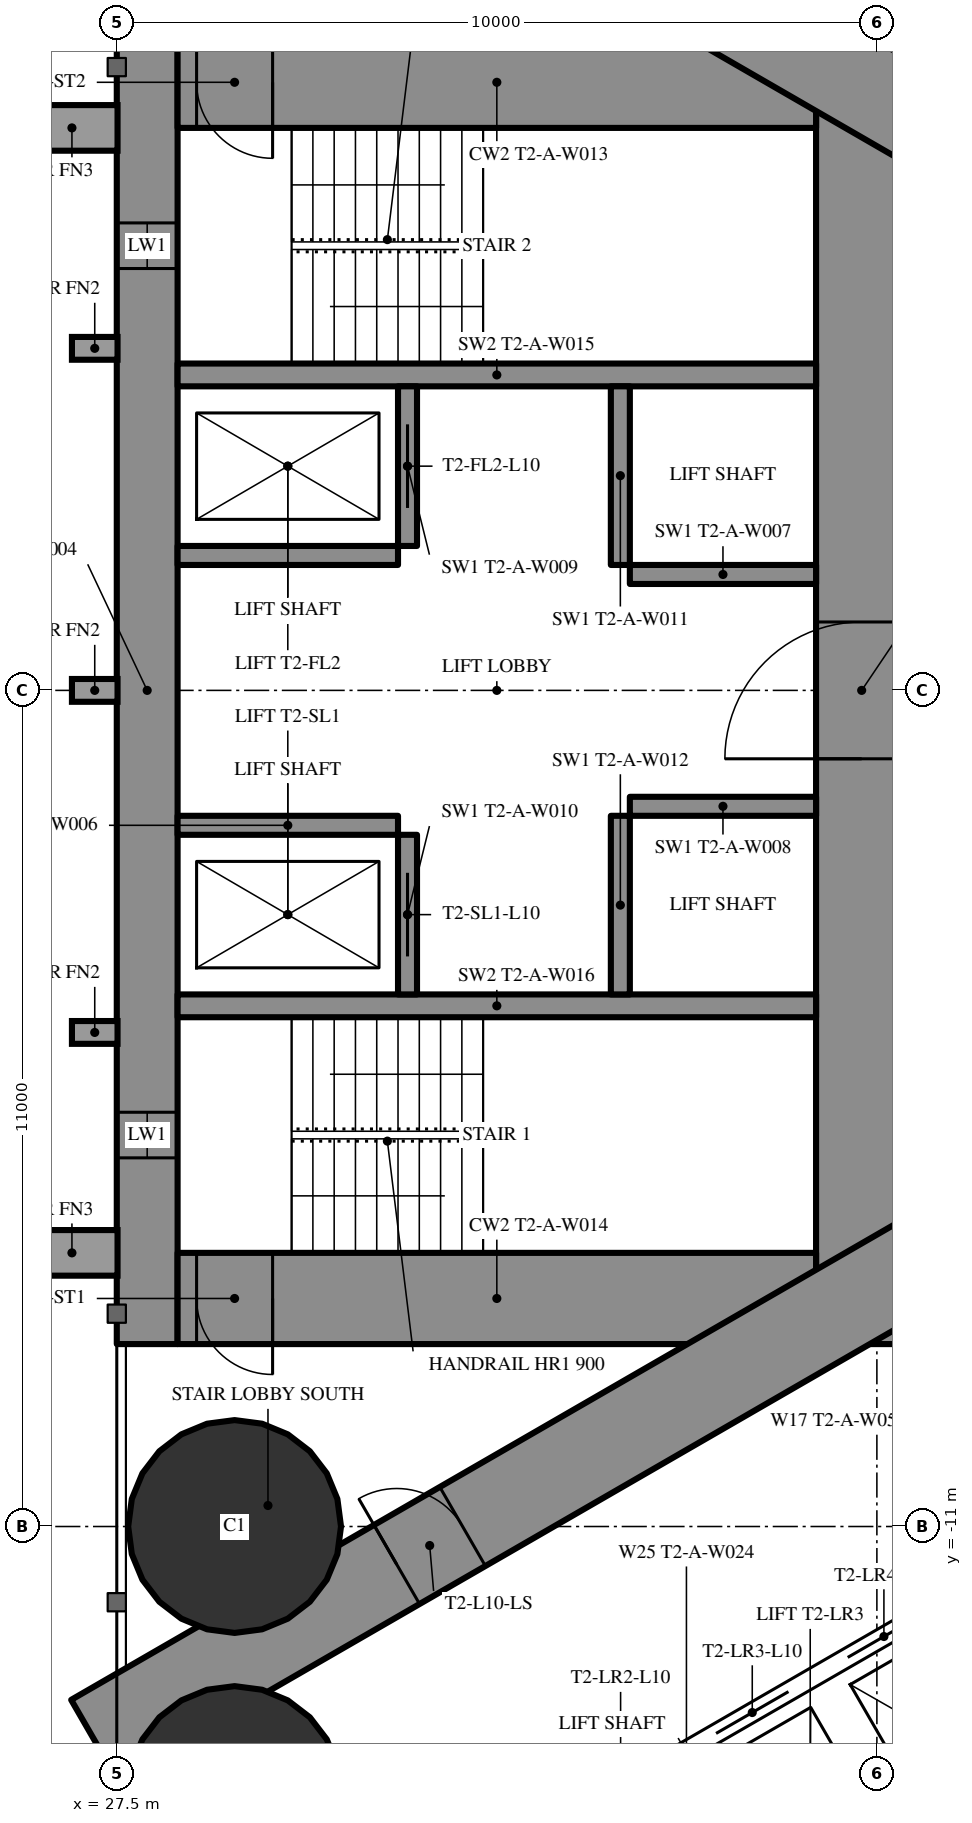
"""IFC4 building model, lengths in metres.
Left out: names, types, materials, properties, quantities, classifications, styles, units other than length and angle.
Written with IfcOpenShell. Run it as: python <this file> out.ifc"""

import sys

from ifc_helpers import new_model, si_unit, direction, frame, frame_2d, origin, origin_2d, place, context, subcontext, project, spatial, rectangle, hollow_circle, extrude, element, fill, save


model = new_model("IFC4")
c1 = context("Model", 3, precision=1e-05, world=origin(), true_north=direction((0.0, 1.0)))
c2 = subcontext(c1, "Body", "Model", "MODEL_VIEW")
j1 = project(units=[si_unit("LENGTHUNIT", "METRE"), si_unit("PLANEANGLEUNIT", "RADIAN")], contexts=[c1])
p1 = place(None, origin())
s1 = spatial("IfcSite", under=j1, at=p1, CompositionType="ELEMENT")
p2 = place(p1, origin())
s2 = spatial("IfcBuilding", under=s1, at=p2, CompositionType="ELEMENT")
p3 = place(p2, frame((0.0, 0.0, 42.5)))
s3 = spatial("IfcBuildingStorey", under=s2, at=p3, CompositionType="ELEMENT", Elevation=42.5)
for number, where, z_axis, x_axis in (
    (1, (29.05, -11.0, 0.0), (0.0, 0.0, 1.0), (1.0, 0.0, 0.0)),
    (2, (29.05, -14.5, 0.0), (0.0, 0.0, 1.0), (1.0, 0.0, 0.0)),
):
    element("IfcColumn", number, at=place(p3, frame(where, z_axis=z_axis, x_axis=x_axis)), inside=s3, PredefinedType="COLUMN", context=c2, shape_type="SweptSolid", body=[
        extrude(hollow_circle(Radius=1.4, WallThickness=0.12, at=origin_2d()), origin(), (0.0, 0.0, 1.0), 3.5),
    ])
p4 = place(p3, frame((27.9, -8.6, 0.0), z_axis=(0.0, 0.0, 1.0), x_axis=(0.0, 1.0, 0.0)))
e3 = element("IfcWall", 3, at=p4, inside=s3, PredefinedType="SHEAR", context=c2, shape_type="SweptSolid", body=[
    extrude(rectangle(XDim=17.2, YDim=0.8, at=frame_2d((8.6, 0.0))), origin(), (0.0, 0.0, 1.0), 3.5),
])
p5 = place(p4, frame((2.45, 0.0, 0.6)))
e4 = element("IfcOpeningElement", 4, at=p5, cuts=e3, PredefinedType="OPENING", context=c2, shape_type="SweptSolid", body=[
    extrude(rectangle(XDim=0.6, YDim=2.1, at=frame_2d((0.3, 1.05))), frame((0.0, 0.41, 0.0), z_axis=(0.0, -1.0, 0.0), x_axis=(1.0, 0.0, 0.0)), (0.0, 0.0, 1.0), 0.82),
])
p6 = place(p4, frame((14.15, 0.0, 0.6)))
e5 = element("IfcOpeningElement", 5, at=p6, cuts=e3, PredefinedType="OPENING", context=c2, shape_type="SweptSolid", body=[
    extrude(rectangle(XDim=0.6, YDim=2.1, at=frame_2d((0.3, 1.05))), frame((0.0, 0.41, 0.0), z_axis=(0.0, -1.0, 0.0), x_axis=(1.0, 0.0, 0.0)), (0.0, 0.0, 1.0), 0.82),
])
p7 = place(p3, frame((37.3, -8.6, 0.0), z_axis=(0.0, 0.0, 1.0), x_axis=(0.0, 1.0, 0.0)))
e6 = element("IfcWall", 6, at=p7, inside=s3, PredefinedType="SHEAR", context=c2, shape_type="SweptSolid", body=[
    extrude(rectangle(XDim=17.2, YDim=1.2, at=frame_2d((8.6, 0.0))), origin(), (0.0, 0.0, 1.0), 3.5),
])
p8 = place(p7, frame((7.7, 0.0, 0.0)))
e7 = element("IfcOpeningElement", 7, at=p8, cuts=e6, PredefinedType="OPENING", context=c2, shape_type="SweptSolid", body=[
    extrude(rectangle(XDim=1.8, YDim=2.2, at=frame_2d((0.9, 1.1))), frame((0.0, 0.61, 0.0), z_axis=(0.0, -1.0, 0.0), x_axis=(1.0, 0.0, 0.0)), (0.0, 0.0, 1.0), 1.22),
])
p9 = place(p3, frame((28.3, -8.0, 0.0), z_axis=(0.0, 0.0, 1.0), x_axis=(1.0, 0.0, 0.0)))
e8 = element("IfcWall", 8, at=p9, inside=s3, PredefinedType="SHEAR", context=c2, shape_type="SweptSolid", body=[
    extrude(rectangle(XDim=8.4, YDim=1.2, at=frame_2d((4.2, 0.0))), origin(), (0.0, 0.0, 1.0), 3.5),
])
p10 = place(p9, frame((0.25, 0.0, 0.0)))
e9 = element("IfcOpeningElement", 9, at=p10, cuts=e8, PredefinedType="OPENING", context=c2, shape_type="SweptSolid", body=[
    extrude(rectangle(XDim=1.0, YDim=2.2, at=frame_2d((0.5, 1.1))), frame((0.0, 0.61, 0.0), z_axis=(0.0, -1.0, 0.0), x_axis=(1.0, 0.0, 0.0)), (0.0, 0.0, 1.0), 1.22),
])
p11 = place(p3, frame((28.3, 8.0, 0.0), z_axis=(0.0, 0.0, 1.0), x_axis=(1.0, 0.0, 0.0)))
e10 = element("IfcWall", 10, at=p11, inside=s3, PredefinedType="SHEAR", context=c2, shape_type="SweptSolid", body=[
    extrude(rectangle(XDim=8.4, YDim=1.2, at=frame_2d((4.2, 0.0))), origin(), (0.0, 0.0, 1.0), 3.5),
])
p12 = place(p11, frame((0.25, 0.0, 0.0)))
e11 = element("IfcOpeningElement", 11, at=p12, cuts=e10, PredefinedType="OPENING", context=c2, shape_type="SweptSolid", body=[
    extrude(rectangle(XDim=1.0, YDim=2.2, at=frame_2d((0.5, 1.1))), frame((0.0, 0.61, 0.0), z_axis=(0.0, -1.0, 0.0), x_axis=(1.0, 0.0, 0.0)), (0.0, 0.0, 1.0), 1.22),
])
for number, where, z_axis, x_axis in (
    (12, (28.3, -4.15, 0.0), (0.0, 0.0, 1.0), (1.0, 0.0, 0.0)),
    (13, (28.3, 4.15, 0.0), (0.0, 0.0, 1.0), (1.0, 0.0, 0.0)),
):
    element("IfcWall", number, at=place(p3, frame(where, z_axis=z_axis, x_axis=x_axis)), inside=s3, PredefinedType="SHEAR", context=c2, shape_type="SweptSolid", body=[
        extrude(rectangle(XDim=8.4, YDim=0.3, at=frame_2d((4.2, 0.0))), origin(), (0.0, 0.0, 1.0), 3.5),
    ])
p13 = place(p3, frame((31.325, -4.0, 0.0), z_axis=(0.0, 0.0, 1.0), x_axis=(0.0, 1.0, 0.0)))
e14 = element("IfcWall", 14, at=p13, inside=s3, PredefinedType="SHEAR", context=c2, shape_type="SweptSolid", body=[
    extrude(rectangle(XDim=2.1, YDim=0.25, at=frame_2d((1.05, 0.0))), origin(), (0.0, 0.0, 1.0), 3.5),
])
p14 = place(p13, frame((0.5, 0.0, 0.0)))
e15 = element("IfcOpeningElement", 15, at=p14, cuts=e14, PredefinedType="OPENING", context=c2, shape_type="SweptSolid", body=[
    extrude(rectangle(XDim=1.1, YDim=2.2, at=frame_2d((0.55, 1.1))), frame((0.0, 0.135, 0.0), z_axis=(0.0, -1.0, 0.0), x_axis=(1.0, 0.0, 0.0)), (0.0, 0.0, 1.0), 0.27),
])
p15 = place(p3, frame((34.125, -4.0, 0.0), z_axis=(0.0, 0.0, 1.0), x_axis=(0.0, 1.0, 0.0)))
e16 = element("IfcWall", 16, at=p15, inside=s3, PredefinedType="SHEAR", context=c2, shape_type="SweptSolid", body=[
    extrude(rectangle(XDim=2.35, YDim=0.25, at=frame_2d((1.175, 0.0))), origin(), (0.0, 0.0, 1.0), 3.5),
])
p16 = place(p3, frame((28.3, -1.775, 0.0), z_axis=(0.0, 0.0, 1.0), x_axis=(1.0, 0.0, 0.0)))
e17 = element("IfcWall", 17, at=p16, inside=s3, PredefinedType="SHEAR", context=c2, shape_type="SweptSolid", body=[
    extrude(rectangle(XDim=2.9, YDim=0.25, at=frame_2d((1.45, 0.0))), origin(), (0.0, 0.0, 1.0), 3.5),
])
p17 = place(p3, frame((34.25, -1.525, 0.0), z_axis=(0.0, 0.0, 1.0), x_axis=(1.0, 0.0, 0.0)))
e18 = element("IfcWall", 18, at=p17, inside=s3, PredefinedType="SHEAR", context=c2, shape_type="SweptSolid", body=[
    extrude(rectangle(XDim=2.45, YDim=0.25, at=frame_2d((1.225, 0.0))), origin(), (0.0, 0.0, 1.0), 3.5),
])
p18 = place(p3, frame((31.325, 1.9, 0.0), z_axis=(0.0, 0.0, 1.0), x_axis=(0.0, 1.0, 0.0)))
e19 = element("IfcWall", 19, at=p18, inside=s3, PredefinedType="SHEAR", context=c2, shape_type="SweptSolid", body=[
    extrude(rectangle(XDim=2.1, YDim=0.25, at=frame_2d((1.05, 0.0))), origin(), (0.0, 0.0, 1.0), 3.5),
])
p19 = place(p18, frame((0.5, 0.0, 0.0)))
e20 = element("IfcOpeningElement", 20, at=p19, cuts=e19, PredefinedType="OPENING", context=c2, shape_type="SweptSolid", body=[
    extrude(rectangle(XDim=1.1, YDim=2.2, at=frame_2d((0.55, 1.1))), frame((0.0, 0.135, 0.0), z_axis=(0.0, -1.0, 0.0), x_axis=(1.0, 0.0, 0.0)), (0.0, 0.0, 1.0), 0.27),
])
p20 = place(p3, frame((34.125, 1.65, 0.0), z_axis=(0.0, 0.0, 1.0), x_axis=(0.0, 1.0, 0.0)))
e21 = element("IfcWall", 21, at=p20, inside=s3, PredefinedType="SHEAR", context=c2, shape_type="SweptSolid", body=[
    extrude(rectangle(XDim=2.35, YDim=0.25, at=frame_2d((1.175, 0.0))), origin(), (0.0, 0.0, 1.0), 3.5),
])
p21 = place(p3, frame((28.3, 1.775, 0.0), z_axis=(0.0, 0.0, 1.0), x_axis=(1.0, 0.0, 0.0)))
e22 = element("IfcWall", 22, at=p21, inside=s3, PredefinedType="SHEAR", context=c2, shape_type="SweptSolid", body=[
    extrude(rectangle(XDim=2.9, YDim=0.25, at=frame_2d((1.45, 0.0))), origin(), (0.0, 0.0, 1.0), 3.5),
])
p22 = place(p3, frame((34.25, 1.525, 0.0), z_axis=(0.0, 0.0, 1.0), x_axis=(1.0, 0.0, 0.0)))
e23 = element("IfcWall", 23, at=p22, inside=s3, PredefinedType="SHEAR", context=c2, shape_type="SweptSolid", body=[
    extrude(rectangle(XDim=2.45, YDim=0.25, at=frame_2d((1.225, 0.0))), origin(), (0.0, 0.0, 1.0), 3.5),
])
p23 = place(p3, frame((27.2, -13.8, 0.0), z_axis=(0.0, 0.0, 1.0), x_axis=(0.866027159892, 0.499996958321, 0.0)))
e24 = element("IfcWall", 24, at=p23, inside=s3, PredefinedType="SHEAR", context=c2, shape_type="SweptSolid", body=[
    extrude(rectangle(XDim=27.947, YDim=1.2, at=frame_2d((13.973, 0.0))), origin(), (0.0, 0.0, 1.0), 3.5),
])
p24 = place(p23, frame((4.6, 0.0, 0.0)))
e25 = element("IfcOpeningElement", 25, at=p24, cuts=e24, PredefinedType="OPENING", context=c2, shape_type="SweptSolid", body=[
    extrude(rectangle(XDim=1.0, YDim=2.2, at=frame_2d((0.5, 1.1))), frame((0.0, 0.61, 0.0), z_axis=(0.0, -1.0, 0.0), x_axis=(1.0, 0.0, 0.0)), (0.0, 0.0, 1.0), 1.22),
])
p25 = place(p23, frame((13.395, 0.0, 0.0)))
e26 = element("IfcOpeningElement", 26, at=p25, cuts=e24, PredefinedType="OPENING", context=c2, shape_type="SweptSolid", body=[
    extrude(rectangle(XDim=1.8, YDim=2.2, at=frame_2d((0.9, 1.1))), frame((0.0, 0.61, 0.0), z_axis=(0.0, -1.0, 0.0), x_axis=(1.0, 0.0, 0.0)), (0.0, 0.0, 1.0), 1.22),
])
p26 = place(p3, frame((27.2, 13.8, 0.0), z_axis=(0.0, 0.0, 1.0), x_axis=(0.866024515034, -0.500001539357, 0.0)))
e27 = element("IfcWall", 27, at=p26, inside=s3, PredefinedType="SHEAR", context=c2, shape_type="SweptSolid", body=[
    extrude(rectangle(XDim=26.907, YDim=1.2, at=frame_2d((13.454, 0.0))), origin(), (0.0, 0.0, 1.0), 3.5),
])
p27 = place(p26, frame((4.6, 0.0, 0.0)))
e28 = element("IfcOpeningElement", 28, at=p27, cuts=e27, PredefinedType="OPENING", context=c2, shape_type="SweptSolid", body=[
    extrude(rectangle(XDim=1.0, YDim=2.2, at=frame_2d((0.5, 1.1))), frame((0.0, 0.61, 0.0), z_axis=(0.0, -1.0, 0.0), x_axis=(1.0, 0.0, 0.0)), (0.0, 0.0, 1.0), 1.22),
])
p28 = place(p26, frame((13.395, 0.0, 0.0)))
e29 = element("IfcOpeningElement", 29, at=p28, cuts=e27, PredefinedType="OPENING", context=c2, shape_type="SweptSolid", body=[
    extrude(rectangle(XDim=1.8, YDim=2.2, at=frame_2d((0.9, 1.1))), frame((0.0, 0.61, 0.0), z_axis=(0.0, -1.0, 0.0), x_axis=(1.0, 0.0, 0.0)), (0.0, 0.0, 1.0), 1.22),
])
p29 = place(p3, frame((36.834, 10.894, 0.0), z_axis=(0.0, 0.0, 1.0), x_axis=(0.866028157229, -0.499995230863, 0.0)))
e30 = element("IfcWall", 30, at=p29, inside=s3, PredefinedType="PARTITIONING", context=c2, shape_type="SweptSolid", body=[
    extrude(rectangle(XDim=21.667, YDim=0.2, at=frame_2d((10.833, 0.0))), origin(), (0.0, 0.0, 1.0), 3.25),
])
p30 = place(p29, frame((18.885, 0.0, 0.0)))
e31 = element("IfcOpeningElement", 31, at=p30, cuts=e30, PredefinedType="OPENING", context=c2, shape_type="SweptSolid", body=[
    extrude(rectangle(XDim=0.95, YDim=2.2, at=frame_2d((0.475, 1.1))), frame((0.0, 0.11, 0.0), z_axis=(0.0, -1.0, 0.0), x_axis=(1.0, 0.0, 0.0)), (0.0, 0.0, 1.0), 0.22),
])
p31 = place(p29, frame((10.212, 0.0, 0.0)))
e32 = element("IfcOpeningElement", 32, at=p31, cuts=e30, PredefinedType="OPENING", context=c2, shape_type="SweptSolid", body=[
    extrude(rectangle(XDim=0.95, YDim=2.2, at=frame_2d((0.475, 1.1))), frame((0.0, 0.11, 0.0), z_axis=(0.0, -1.0, 0.0), x_axis=(1.0, 0.0, 0.0)), (0.0, 0.0, 1.0), 0.22),
])
p32 = place(p29, frame((8.225, 0.0, 0.0)))
e33 = element("IfcOpeningElement", 33, at=p32, cuts=e30, PredefinedType="OPENING", context=c2, shape_type="SweptSolid", body=[
    extrude(rectangle(XDim=0.95, YDim=2.2, at=frame_2d((0.475, 1.1))), frame((0.0, 0.11, 0.0), z_axis=(0.0, -1.0, 0.0), x_axis=(1.0, 0.0, 0.0)), (0.0, 0.0, 1.0), 0.22),
])
p33 = place(p29, frame((1.825, 0.0, 0.0)))
e34 = element("IfcOpeningElement", 34, at=p33, cuts=e30, PredefinedType="OPENING", context=c2, shape_type="SweptSolid", body=[
    extrude(rectangle(XDim=0.95, YDim=2.2, at=frame_2d((0.475, 1.1))), frame((0.0, 0.11, 0.0), z_axis=(0.0, -1.0, 0.0), x_axis=(1.0, 0.0, 0.0)), (0.0, 0.0, 1.0), 0.22),
])
p34 = place(p29, frame((0.246, 0.0, 0.0)))
e35 = element("IfcOpeningElement", 35, at=p34, cuts=e30, PredefinedType="OPENING", context=c2, shape_type="SweptSolid", body=[
    extrude(rectangle(XDim=0.9, YDim=2.2, at=frame_2d((0.45, 1.1))), frame((0.0, 0.11, 0.0), z_axis=(0.0, -1.0, 0.0), x_axis=(1.0, 0.0, 0.0)), (0.0, 0.0, 1.0), 0.22),
])
p35 = place(p3, frame((31.271, -16.097, 0.0), z_axis=(0.0, 0.0, 1.0), x_axis=(0.86604045752, 0.499973925258, 0.0)))
e36 = element("IfcWall", 36, at=p35, inside=s3, PredefinedType="PARTITIONING", context=c2, shape_type="SweptSolid", body=[
    extrude(rectangle(XDim=8.6, YDim=0.25, at=frame_2d((4.3, 0.0))), origin(), (0.0, 0.0, 1.0), 3.25),
])
p36 = place(p35, frame((0.75, 0.0, 0.0)))
e37 = element("IfcOpeningElement", 37, at=p36, cuts=e36, PredefinedType="OPENING", context=c2, shape_type="SweptSolid", body=[
    extrude(rectangle(XDim=1.1, YDim=2.2, at=frame_2d((0.55, 1.1))), frame((0.0, 0.135, 0.0), z_axis=(0.0, -1.0, 0.0), x_axis=(1.0, 0.0, 0.0)), (0.0, 0.0, 1.0), 0.27),
])
p37 = place(p35, frame((2.75, 0.0, 0.0)))
e38 = element("IfcOpeningElement", 38, at=p37, cuts=e36, PredefinedType="OPENING", context=c2, shape_type="SweptSolid", body=[
    extrude(rectangle(XDim=1.1, YDim=2.2, at=frame_2d((0.55, 1.1))), frame((0.0, 0.135, 0.0), z_axis=(0.0, -1.0, 0.0), x_axis=(1.0, 0.0, 0.0)), (0.0, 0.0, 1.0), 0.27),
])
p38 = place(p35, frame((4.75, 0.0, 0.0)))
e39 = element("IfcOpeningElement", 39, at=p38, cuts=e36, PredefinedType="OPENING", context=c2, shape_type="SweptSolid", body=[
    extrude(rectangle(XDim=1.1, YDim=2.2, at=frame_2d((0.55, 1.1))), frame((0.0, 0.135, 0.0), z_axis=(0.0, -1.0, 0.0), x_axis=(1.0, 0.0, 0.0)), (0.0, 0.0, 1.0), 0.27),
])
p39 = place(p35, frame((6.75, 0.0, 0.0)))
e40 = element("IfcOpeningElement", 40, at=p39, cuts=e36, PredefinedType="OPENING", context=c2, shape_type="SweptSolid", body=[
    extrude(rectangle(XDim=1.1, YDim=2.2, at=frame_2d((0.55, 1.1))), frame((0.0, 0.135, 0.0), z_axis=(0.0, -1.0, 0.0), x_axis=(1.0, 0.0, 0.0)), (0.0, 0.0, 1.0), 0.27),
])
p40 = place(p24, origin())
e41 = element("IfcDoor", 41, at=p40, inside=s3, OperationType="SINGLE_SWING_LEFT", PredefinedType="DOOR", context=c2, shape_type="SweptSolid", body=[
    extrude(rectangle(XDim=1.0, YDim=2.2, at=frame_2d((0.5, 1.1))), frame((0.0, 0.025, 0.0), z_axis=(0.0, -1.0, 0.0), x_axis=(1.0, 0.0, 0.0)), (0.0, 0.0, 1.0), 0.05),
])
fill(e25, e41)
p41 = place(p8, origin())
e42 = element("IfcDoor", 42, at=p41, inside=s3, OperationType="DOUBLE_DOOR_SINGLE_SWING", PredefinedType="DOOR", context=c2, shape_type="SweptSolid", body=[
    extrude(rectangle(XDim=1.8, YDim=2.2, at=frame_2d((0.9, 1.1))), frame((0.0, 0.025, 0.0), z_axis=(0.0, -1.0, 0.0), x_axis=(1.0, 0.0, 0.0)), (0.0, 0.0, 1.0), 0.05),
])
fill(e7, e42)
p42 = place(p10, origin())
e43 = element("IfcDoor", 43, at=p42, inside=s3, OperationType="SINGLE_SWING_RIGHT", PredefinedType="DOOR", context=c2, shape_type="SweptSolid", body=[
    extrude(rectangle(XDim=1.0, YDim=2.2, at=frame_2d((0.5, 1.1))), frame((0.0, 0.025, 0.0), z_axis=(0.0, -1.0, 0.0), x_axis=(1.0, 0.0, 0.0)), (0.0, 0.0, 1.0), 0.05),
])
fill(e9, e43)
p43 = place(p12, origin())
e44 = element("IfcDoor", 44, at=p43, inside=s3, OperationType="SINGLE_SWING_RIGHT", PredefinedType="DOOR", context=c2, shape_type="SweptSolid", body=[
    extrude(rectangle(XDim=1.0, YDim=2.2, at=frame_2d((0.5, 1.1))), frame((0.0, 0.025, 0.0), z_axis=(0.0, -1.0, 0.0), x_axis=(1.0, 0.0, 0.0)), (0.0, 0.0, 1.0), 0.05),
])
fill(e11, e44)
p44 = place(p14, origin())
e45 = element("IfcDoor", 45, at=p44, inside=s3, OperationType="SLIDING_TO_LEFT", PredefinedType="USERDEFINED", context=c2, shape_type="SweptSolid", body=[
    extrude(rectangle(XDim=1.1, YDim=2.2, at=frame_2d((0.55, 1.1))), frame((0.0, 0.025, 0.0), z_axis=(0.0, -1.0, 0.0), x_axis=(1.0, 0.0, 0.0)), (0.0, 0.0, 1.0), 0.05),
])
fill(e15, e45)
p45 = place(p19, origin())
e46 = element("IfcDoor", 46, at=p45, inside=s3, OperationType="SLIDING_TO_LEFT", PredefinedType="USERDEFINED", context=c2, shape_type="SweptSolid", body=[
    extrude(rectangle(XDim=1.1, YDim=2.2, at=frame_2d((0.55, 1.1))), frame((0.0, 0.025, 0.0), z_axis=(0.0, -1.0, 0.0), x_axis=(1.0, 0.0, 0.0)), (0.0, 0.0, 1.0), 0.05),
])
fill(e20, e46)
p46 = place(p38, origin())
e47 = element("IfcDoor", 47, at=p46, inside=s3, OperationType="DOUBLE_DOOR_SLIDING", PredefinedType="USERDEFINED", context=c2, shape_type="SweptSolid", body=[
    extrude(rectangle(XDim=1.1, YDim=2.2, at=frame_2d((0.55, 1.1))), frame((0.0, 0.025, 0.0), z_axis=(0.0, -1.0, 0.0), x_axis=(1.0, 0.0, 0.0)), (0.0, 0.0, 1.0), 0.05),
])
fill(e39, e47)
p47 = place(p39, origin())
e48 = element("IfcDoor", 48, at=p47, inside=s3, OperationType="DOUBLE_DOOR_SLIDING", PredefinedType="USERDEFINED", context=c2, shape_type="SweptSolid", body=[
    extrude(rectangle(XDim=1.1, YDim=2.2, at=frame_2d((0.55, 1.1))), frame((0.0, 0.025, 0.0), z_axis=(0.0, -1.0, 0.0), x_axis=(1.0, 0.0, 0.0)), (0.0, 0.0, 1.0), 0.05),
])
fill(e40, e48)
p48 = place(p5, origin())
e49 = element("IfcWindow", 49, at=p48, inside=s3, PartitioningType="SINGLE_PANEL", PredefinedType="WINDOW", context=c2, shape_type="SweptSolid", body=[
    extrude(rectangle(XDim=0.6, YDim=2.1, at=frame_2d((0.3, 1.05))), frame((0.0, 0.03, 0.0), z_axis=(0.0, -1.0, 0.0), x_axis=(1.0, 0.0, 0.0)), (0.0, 0.0, 1.0), 0.06),
])
fill(e4, e49)
p49 = place(p6, origin())
e50 = element("IfcWindow", 50, at=p49, inside=s3, PartitioningType="SINGLE_PANEL", PredefinedType="WINDOW", context=c2, shape_type="SweptSolid", body=[
    extrude(rectangle(XDim=0.6, YDim=2.1, at=frame_2d((0.3, 1.05))), frame((0.0, 0.03, 0.0), z_axis=(0.0, -1.0, 0.0), x_axis=(1.0, 0.0, 0.0)), (0.0, 0.0, 1.0), 0.06),
])
fill(e5, e50)
save(model, sys.argv[1])
